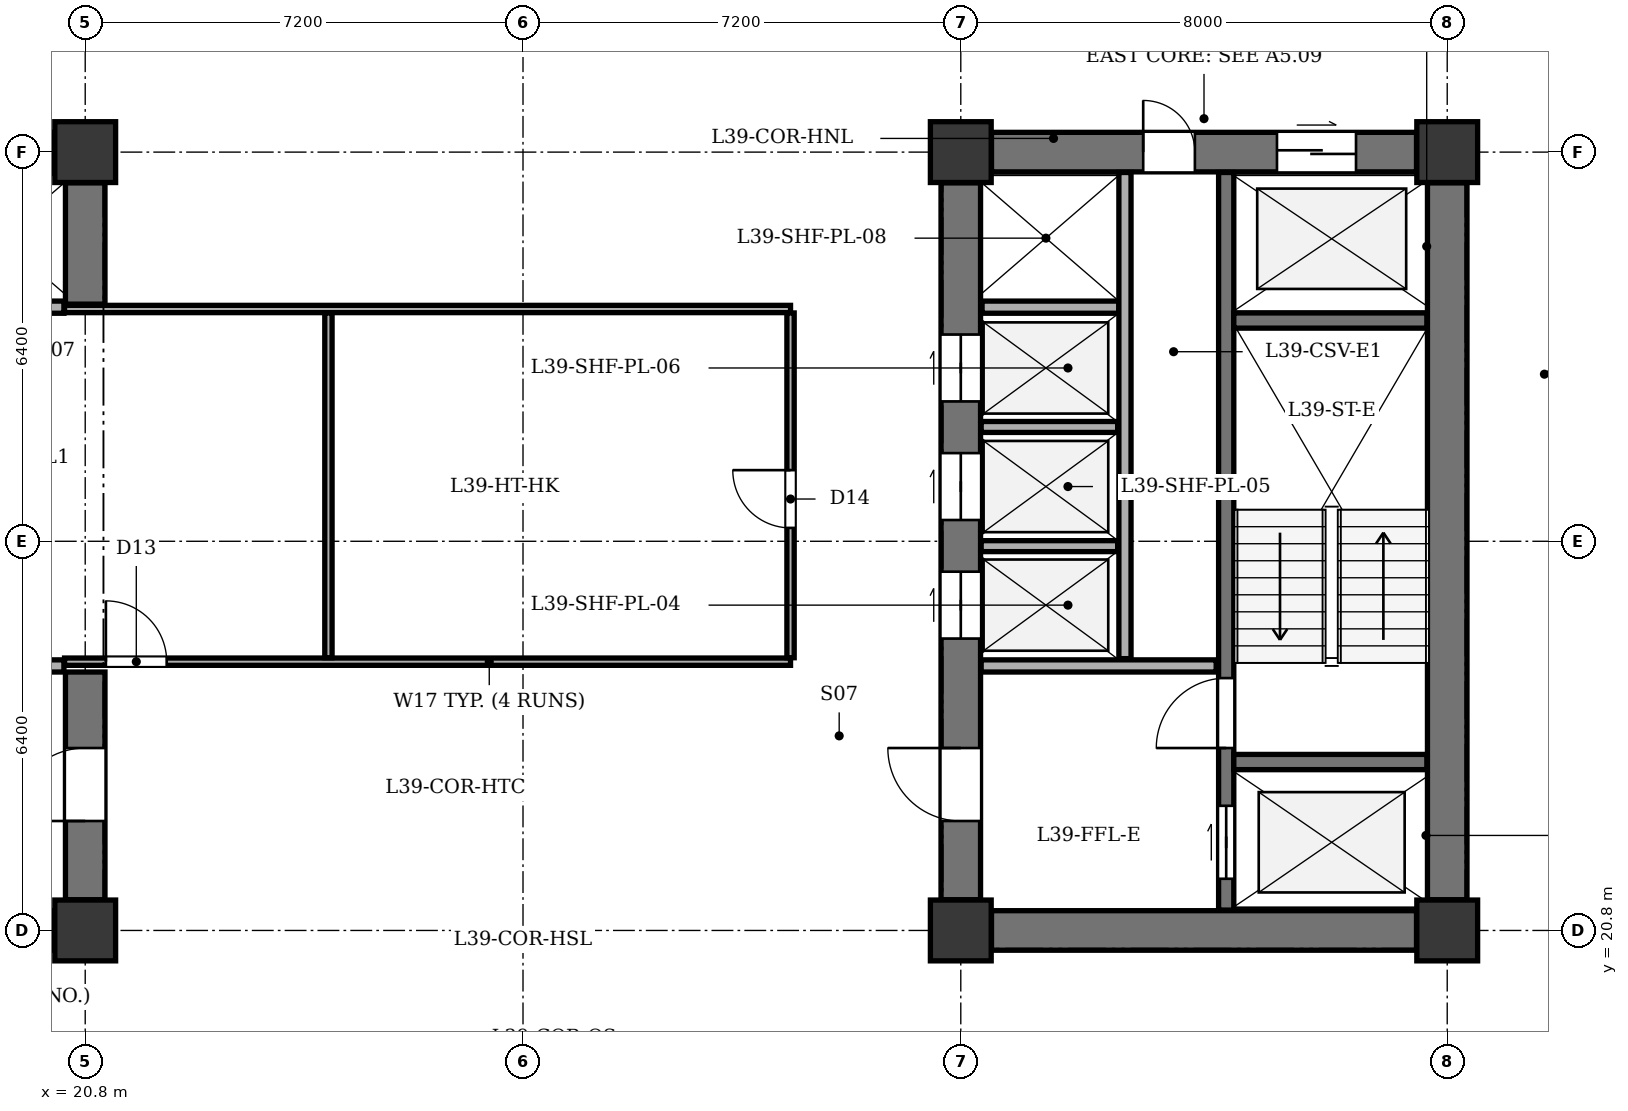
"""IFC4 building model, lengths in metres.
Left out: names, types, materials, properties, quantities, classifications, styles, units other than length and angle.
Written with IfcOpenShell. Run it as: python <this file> out.ifc"""

import sys

from ifc_helpers import new_model, si_unit, direction, frame, frame_2d, origin, origin_2d, place, context, subcontext, project, spatial, rectangle, extrude, element, fill, save


model = new_model("IFC4")
c1 = context("Model", 3, precision=1e-05, world=origin(), true_north=direction((0.0, 1.0)))
c2 = subcontext(c1, "Body", "Model", "MODEL_VIEW")
j1 = project(units=[si_unit("LENGTHUNIT", "METRE"), si_unit("PLANEANGLEUNIT", "RADIAN")], contexts=[c1])
p1 = place(None, origin())
s1 = spatial("IfcSite", under=j1, at=p1, CompositionType="ELEMENT")
p2 = place(p1, origin())
s2 = spatial("IfcBuilding", under=s1, at=p2, CompositionType="ELEMENT")
p3 = place(p2, frame((0.0, 0.0, 155.3)))
s3 = spatial("IfcBuildingStorey", under=s2, at=p3, CompositionType="ELEMENT", Elevation=155.3)
for number, where, z_axis, x_axis in (
    (1, (20.8, 20.8, 0.0), (0.0, 0.0, 1.0), (1.0, 0.0, 0.0)),
    (2, (20.8, 33.6, 0.0), (0.0, 0.0, 1.0), (1.0, 0.0, 0.0)),
    (3, (35.2, 20.8, 0.0), (0.0, 0.0, 1.0), (1.0, 0.0, 0.0)),
    (4, (43.2, 20.8, 0.0), (0.0, 0.0, 1.0), (1.0, 0.0, 0.0)),
    (5, (35.2, 33.6, 0.0), (0.0, 0.0, 1.0), (1.0, 0.0, 0.0)),
    (6, (43.2, 33.6, 0.0), (0.0, 0.0, 1.0), (1.0, 0.0, 0.0)),
):
    element("IfcColumn", number, at=place(p3, frame(where, z_axis=z_axis, x_axis=x_axis)), inside=s3, PredefinedType="COLUMN", context=c2, shape_type="SweptSolid", body=[
        extrude(rectangle(XDim=1.0, YDim=1.0, at=origin_2d()), origin(), (0.0, 0.0, 1.0), 3.5),
    ])
p4 = place(p3, frame((13.305, 20.8, 0.0), z_axis=(0.0, 0.0, 1.0), x_axis=(1.0, 0.0, 0.0)))
e7 = element("IfcWall", 7, at=p4, inside=s3, PredefinedType="SHEAR", context=c2, shape_type="SweptSolid", body=[
    extrude(rectangle(XDim=6.99, YDim=0.65, at=frame_2d((3.495, 0.0))), origin(), (0.0, 0.0, 1.0), 3.2),
])
p5 = place(p3, frame((13.305, 33.6, 0.0), z_axis=(0.0, 0.0, 1.0), x_axis=(1.0, 0.0, 0.0)))
e8 = element("IfcWall", 8, at=p5, inside=s3, PredefinedType="SHEAR", context=c2, shape_type="SweptSolid", body=[
    extrude(rectangle(XDim=6.99, YDim=0.65, at=frame_2d((3.495, 0.0))), origin(), (0.0, 0.0, 1.0), 3.2),
])
p6 = place(p5, frame((1.095, 0.0, 0.0)))
e9 = element("IfcOpeningElement", 9, at=p6, cuts=e8, PredefinedType="OPENING", context=c2, shape_type="SweptSolid", body=[
    extrude(rectangle(XDim=0.85, YDim=2.02, at=frame_2d((0.425, 1.01))), frame((0.0, 0.335, 0.0), z_axis=(0.0, -1.0, 0.0), x_axis=(1.0, 0.0, 0.0)), (0.0, 0.0, 1.0), 0.67),
])
p7 = place(p3, frame((20.8, 21.305, 0.0), z_axis=(0.0, 0.0, 1.0), x_axis=(0.0, 1.0, 0.0)))
e10 = element("IfcWall", 10, at=p7, inside=s3, PredefinedType="SHEAR", context=c2, shape_type="SweptSolid", body=[
    extrude(rectangle(XDim=3.745, YDim=0.65, at=frame_2d((1.873, 0.0))), origin(), (0.0, 0.0, 1.0), 3.2),
])
p8 = place(p7, frame((1.295, 0.0, 0.0)))
e11 = element("IfcOpeningElement", 11, at=p8, cuts=e10, PredefinedType="OPENING", context=c2, shape_type="SweptSolid", body=[
    extrude(rectangle(XDim=1.2, YDim=2.15, at=frame_2d((0.6, 1.075))), frame((0.0, 0.335, 0.0), z_axis=(0.0, -1.0, 0.0), x_axis=(1.0, 0.0, 0.0)), (0.0, 0.0, 1.0), 0.67),
])
p9 = place(p3, frame((20.8, 31.1, 0.0), z_axis=(0.0, 0.0, 1.0), x_axis=(0.0, 1.0, 0.0)))
e12 = element("IfcWall", 12, at=p9, inside=s3, PredefinedType="SHEAR", context=c2, shape_type="SweptSolid", body=[
    extrude(rectangle(XDim=1.995, YDim=0.65, at=frame_2d((0.998, 0.0))), origin(), (0.0, 0.0, 1.0), 3.2),
])
for number, where, z_axis, x_axis in (
    (13, (16.6, 25.15, 0.0), (0.0, 0.0, 1.0), (1.0, 0.0, 0.0)),
    (14, (16.6, 31.05, 0.0), (0.0, 0.0, 1.0), (1.0, 0.0, 0.0)),
):
    element("IfcWall", number, at=place(p3, frame(where, z_axis=z_axis, x_axis=x_axis)), inside=s3, PredefinedType="SOLIDWALL", context=c2, shape_type="SweptSolid", body=[
        extrude(rectangle(XDim=3.85, YDim=0.2, at=frame_2d((1.925, 0.0))), origin(), (0.0, 0.0, 1.0), 3.2),
    ])
p10 = place(p3, frame((43.2, 21.305, 0.0), z_axis=(0.0, 0.0, 1.0), x_axis=(0.0, 1.0, 0.0)))
e15 = element("IfcWall", 15, at=p10, inside=s3, PredefinedType="SHEAR", context=c2, shape_type="SweptSolid", body=[
    extrude(rectangle(XDim=11.79, YDim=0.65, at=frame_2d((5.895, 0.0))), origin(), (0.0, 0.0, 1.0), 3.2),
])
p11 = place(p3, frame((35.705, 20.8, 0.0), z_axis=(0.0, 0.0, 1.0), x_axis=(1.0, 0.0, 0.0)))
e16 = element("IfcWall", 16, at=p11, inside=s3, PredefinedType="SHEAR", context=c2, shape_type="SweptSolid", body=[
    extrude(rectangle(XDim=6.99, YDim=0.65, at=frame_2d((3.495, 0.0))), origin(), (0.0, 0.0, 1.0), 3.2),
])
p12 = place(p3, frame((35.705, 33.6, 0.0), z_axis=(0.0, 0.0, 1.0), x_axis=(1.0, 0.0, 0.0)))
e17 = element("IfcWall", 17, at=p12, inside=s3, PredefinedType="SHEAR", context=c2, shape_type="SweptSolid", body=[
    extrude(rectangle(XDim=6.99, YDim=0.65, at=frame_2d((3.495, 0.0))), origin(), (0.0, 0.0, 1.0), 3.2),
])
p13 = place(p12, frame((4.695, 0.0, 0.0)))
e18 = element("IfcOpeningElement", 18, at=p13, cuts=e17, PredefinedType="OPENING", context=c2, shape_type="SweptSolid", body=[
    extrude(rectangle(XDim=1.3, YDim=2.15, at=frame_2d((0.65, 1.075))), frame((0.0, 0.335, 0.0), z_axis=(0.0, -1.0, 0.0), x_axis=(1.0, 0.0, 0.0)), (0.0, 0.0, 1.0), 0.67),
])
p14 = place(p12, frame((2.495, 0.0, 0.0)))
e19 = element("IfcOpeningElement", 19, at=p14, cuts=e17, PredefinedType="OPENING", context=c2, shape_type="SweptSolid", body=[
    extrude(rectangle(XDim=0.85, YDim=2.02, at=frame_2d((0.425, 1.01))), frame((0.0, 0.335, 0.0), z_axis=(0.0, -1.0, 0.0), x_axis=(1.0, 0.0, 0.0)), (0.0, 0.0, 1.0), 0.67),
])
p15 = place(p3, frame((35.2, 21.305, 0.0), z_axis=(0.0, 0.0, 1.0), x_axis=(0.0, 1.0, 0.0)))
e20 = element("IfcWall", 20, at=p15, inside=s3, PredefinedType="SHEAR", context=c2, shape_type="SweptSolid", body=[
    extrude(rectangle(XDim=11.79, YDim=0.65, at=frame_2d((5.895, 0.0))), origin(), (0.0, 0.0, 1.0), 3.2),
])
p16 = place(p15, frame((1.295, 0.0, 0.0)))
e21 = element("IfcOpeningElement", 21, at=p16, cuts=e20, PredefinedType="OPENING", context=c2, shape_type="SweptSolid", body=[
    extrude(rectangle(XDim=1.2, YDim=2.15, at=frame_2d((0.6, 1.075))), frame((0.0, 0.335, 0.0), z_axis=(0.0, -1.0, 0.0), x_axis=(1.0, 0.0, 0.0)), (0.0, 0.0, 1.0), 0.67),
])
p17 = place(p15, frame((4.295, 0.0, 0.0)))
e22 = element("IfcOpeningElement", 22, at=p17, cuts=e20, PredefinedType="OPENING", context=c2, shape_type="SweptSolid", body=[
    extrude(rectangle(XDim=1.1, YDim=2.1, at=frame_2d((0.55, 1.05))), frame((0.0, 0.335, 0.0), z_axis=(0.0, -1.0, 0.0), x_axis=(1.0, 0.0, 0.0)), (0.0, 0.0, 1.0), 0.67),
])
p18 = place(p15, frame((6.245, 0.0, 0.0)))
e23 = element("IfcOpeningElement", 23, at=p18, cuts=e20, PredefinedType="OPENING", context=c2, shape_type="SweptSolid", body=[
    extrude(rectangle(XDim=1.1, YDim=2.1, at=frame_2d((0.55, 1.05))), frame((0.0, 0.335, 0.0), z_axis=(0.0, -1.0, 0.0), x_axis=(1.0, 0.0, 0.0)), (0.0, 0.0, 1.0), 0.67),
])
p19 = place(p15, frame((8.195, 0.0, 0.0)))
e24 = element("IfcOpeningElement", 24, at=p19, cuts=e20, PredefinedType="OPENING", context=c2, shape_type="SweptSolid", body=[
    extrude(rectangle(XDim=1.1, YDim=2.1, at=frame_2d((0.55, 1.05))), frame((0.0, 0.335, 0.0), z_axis=(0.0, -1.0, 0.0), x_axis=(1.0, 0.0, 0.0)), (0.0, 0.0, 1.0), 0.67),
])
p20 = place(p3, frame((39.565, 21.135, 0.0), z_axis=(0.0, 0.0, 1.0), x_axis=(0.0, 1.0, 0.0)))
e25 = element("IfcWall", 25, at=p20, inside=s3, PredefinedType="SHEAR", context=c2, shape_type="SweptSolid", body=[
    extrude(rectangle(XDim=12.13, YDim=0.25, at=frame_2d((6.065, 0.0))), origin(), (0.0, 0.0, 1.0), 3.2),
])
p21 = place(p20, frame((0.515, 0.0, 0.0)))
e26 = element("IfcOpeningElement", 26, at=p21, cuts=e25, PredefinedType="OPENING", context=c2, shape_type="SweptSolid", body=[
    extrude(rectangle(XDim=1.2, YDim=2.15, at=frame_2d((0.6, 1.075))), frame((0.0, 0.135, 0.0), z_axis=(0.0, -1.0, 0.0), x_axis=(1.0, 0.0, 0.0)), (0.0, 0.0, 1.0), 0.27),
])
p22 = place(p20, frame((2.665, 0.0, 0.0)))
e27 = element("IfcOpeningElement", 27, at=p22, cuts=e25, PredefinedType="OPENING", context=c2, shape_type="SweptSolid", body=[
    extrude(rectangle(XDim=1.15, YDim=2.15, at=frame_2d((0.575, 1.075))), frame((0.0, 0.135, 0.0), z_axis=(0.0, -1.0, 0.0), x_axis=(1.0, 0.0, 0.0)), (0.0, 0.0, 1.0), 0.27),
])
for number, where, z_axis, x_axis in (
    (28, (39.69, 23.57, 0.0), (0.0, 0.0, 1.0), (1.0, 0.0, 0.0)),
    (29, (39.69, 30.83, 0.0), (0.0, 0.0, 1.0), (1.0, 0.0, 0.0)),
):
    element("IfcWall", number, at=place(p3, frame(where, z_axis=z_axis, x_axis=x_axis)), inside=s3, PredefinedType="SHEAR", context=c2, shape_type="SweptSolid", body=[
        extrude(rectangle(XDim=3.175, YDim=0.25, at=frame_2d((1.587, 0.0))), origin(), (0.0, 0.0, 1.0), 3.2),
    ])
p23 = place(p3, frame((35.535, 25.15, 0.0), z_axis=(0.0, 0.0, 1.0), x_axis=(1.0, 0.0, 0.0)))
e30 = element("IfcWall", 30, at=p23, inside=s3, PredefinedType="SOLIDWALL", context=c2, shape_type="SweptSolid", body=[
    extrude(rectangle(XDim=3.865, YDim=0.2, at=frame_2d((1.933, 0.0))), origin(), (0.0, 0.0, 1.0), 3.2),
])
p24 = place(p3, frame((35.55, 31.05, 0.0), z_axis=(0.0, 0.0, 1.0), x_axis=(1.0, 0.0, 0.0)))
e31 = element("IfcWall", 31, at=p24, inside=s3, PredefinedType="SOLIDWALL", context=c2, shape_type="SweptSolid", body=[
    extrude(rectangle(XDim=2.25, YDim=0.2, at=frame_2d((1.125, 0.0))), origin(), (0.0, 0.0, 1.0), 3.2),
])
p25 = place(p3, frame((37.9, 25.27, 0.0), z_axis=(0.0, 0.0, 1.0), x_axis=(0.0, 1.0, 0.0)))
e32 = element("IfcWall", 32, at=p25, inside=s3, PredefinedType="SOLIDWALL", context=c2, shape_type="SweptSolid", body=[
    extrude(rectangle(XDim=7.995, YDim=0.2, at=frame_2d((3.998, 0.0))), origin(), (0.0, 0.0, 1.0), 3.2),
])
for number, where, z_axis, x_axis in (
    (33, (35.535, 27.12, 0.0), (0.0, 0.0, 1.0), (1.0, 0.0, 0.0)),
    (34, (35.535, 29.08, 0.0), (0.0, 0.0, 1.0), (1.0, 0.0, 0.0)),
):
    element("IfcWall", number, at=place(p3, frame(where, z_axis=z_axis, x_axis=x_axis)), inside=s3, PredefinedType="PARTITIONING", context=c2, shape_type="SweptSolid", body=[
        extrude(rectangle(XDim=2.245, YDim=0.18, at=frame_2d((1.123, 0.0))), origin(), (0.0, 0.0, 1.0), 3.2),
    ])
p26 = place(p3, frame((20.46, 25.22, 0.0), z_axis=(0.0, 0.0, 1.0), x_axis=(1.0, 0.0, 0.0)))
e35 = element("IfcWall", 35, at=p26, inside=s3, PredefinedType="PARTITIONING", context=c2, shape_type="SweptSolid", body=[
    extrude(rectangle(XDim=11.94, YDim=0.12, at=frame_2d((5.97, 0.0))), origin(), (0.0, 0.0, 1.0), 3.2),
])
p27 = place(p26, frame((0.68, 0.0, 0.0)))
e36 = element("IfcOpeningElement", 36, at=p27, cuts=e35, PredefinedType="OPENING", context=c2, shape_type="SweptSolid", body=[
    extrude(rectangle(XDim=1.0, YDim=2.1, at=frame_2d((0.5, 1.05))), frame((0.0, 0.07, 0.0), z_axis=(0.0, -1.0, 0.0), x_axis=(1.0, 0.0, 0.0)), (0.0, 0.0, 1.0), 0.14),
])
p28 = place(p3, frame((20.46, 31.02, 0.0), z_axis=(0.0, 0.0, 1.0), x_axis=(1.0, 0.0, 0.0)))
e37 = element("IfcWall", 37, at=p28, inside=s3, PredefinedType="PARTITIONING", context=c2, shape_type="SweptSolid", body=[
    extrude(rectangle(XDim=11.94, YDim=0.12, at=frame_2d((5.97, 0.0))), origin(), (0.0, 0.0, 1.0), 3.2),
])
p29 = place(p3, frame((32.4, 25.285, 0.0), z_axis=(0.0, 0.0, 1.0), x_axis=(0.0, 1.0, 0.0)))
e38 = element("IfcWall", 38, at=p29, inside=s3, PredefinedType="PARTITIONING", context=c2, shape_type="SweptSolid", body=[
    extrude(rectangle(XDim=5.67, YDim=0.12, at=frame_2d((2.835, 0.0))), origin(), (0.0, 0.0, 1.0), 3.2),
])
p30 = place(p29, frame((2.135, 0.0, 0.0)))
e39 = element("IfcOpeningElement", 39, at=p30, cuts=e38, PredefinedType="OPENING", context=c2, shape_type="SweptSolid", body=[
    extrude(rectangle(XDim=0.95, YDim=2.1, at=frame_2d((0.475, 1.05))), frame((0.0, 0.07, 0.0), z_axis=(0.0, -1.0, 0.0), x_axis=(1.0, 0.0, 0.0)), (0.0, 0.0, 1.0), 0.14),
])
p31 = place(p3, frame((24.8, 25.285, 0.0), z_axis=(0.0, 0.0, 1.0), x_axis=(0.0, 1.0, 0.0)))
e40 = element("IfcWall", 40, at=p31, inside=s3, PredefinedType="PARTITIONING", context=c2, shape_type="SweptSolid", body=[
    extrude(rectangle(XDim=5.67, YDim=0.12, at=frame_2d((2.835, 0.0))), origin(), (0.0, 0.0, 1.0), 3.2),
])
p32 = place(p8, origin())
e41 = element("IfcDoor", 41, at=p32, inside=s3, OperationType="SINGLE_SWING_LEFT", PredefinedType="DOOR", context=c2, shape_type="SweptSolid", body=[
    extrude(rectangle(XDim=1.2, YDim=2.15, at=frame_2d((0.6, 1.075))), frame((0.0, 0.025, 0.0), z_axis=(0.0, -1.0, 0.0), x_axis=(1.0, 0.0, 0.0)), (0.0, 0.0, 1.0), 0.05),
])
fill(e11, e41)
p33 = place(p13, origin())
e42 = element("IfcDoor", 42, at=p33, inside=s3, OperationType="DOUBLE_DOOR_SLIDING", PredefinedType="DOOR", context=c2, shape_type="SweptSolid", body=[
    extrude(rectangle(XDim=1.3, YDim=2.15, at=frame_2d((0.65, 1.075))), frame((0.0, 0.025, 0.0), z_axis=(0.0, -1.0, 0.0), x_axis=(1.0, 0.0, 0.0)), (0.0, 0.0, 1.0), 0.05),
])
fill(e18, e42)
p34 = place(p14, origin())
e43 = element("IfcDoor", 43, at=p34, inside=s3, OperationType="SINGLE_SWING_LEFT", PredefinedType="DOOR", context=c2, shape_type="SweptSolid", body=[
    extrude(rectangle(XDim=0.85, YDim=2.02, at=frame_2d((0.425, 1.01))), frame((0.0, 0.025, 0.0), z_axis=(0.0, -1.0, 0.0), x_axis=(1.0, 0.0, 0.0)), (0.0, 0.0, 1.0), 0.05),
])
fill(e19, e43)
p35 = place(p16, origin())
e44 = element("IfcDoor", 44, at=p35, inside=s3, OperationType="SINGLE_SWING_RIGHT", PredefinedType="DOOR", context=c2, shape_type="SweptSolid", body=[
    extrude(rectangle(XDim=1.2, YDim=2.15, at=frame_2d((0.6, 1.075))), frame((0.0, 0.025, 0.0), z_axis=(0.0, -1.0, 0.0), x_axis=(1.0, 0.0, 0.0)), (0.0, 0.0, 1.0), 0.05),
])
fill(e21, e44)
p36 = place(p17, origin())
e45 = element("IfcDoor", 45, at=p36, inside=s3, OperationType="DOUBLE_DOOR_SLIDING", PredefinedType="DOOR", context=c2, shape_type="SweptSolid", body=[
    extrude(rectangle(XDim=1.1, YDim=2.1, at=frame_2d((0.55, 1.05))), frame((0.0, 0.025, 0.0), z_axis=(0.0, -1.0, 0.0), x_axis=(1.0, 0.0, 0.0)), (0.0, 0.0, 1.0), 0.05),
])
fill(e22, e45)
p37 = place(p18, origin())
e46 = element("IfcDoor", 46, at=p37, inside=s3, OperationType="DOUBLE_DOOR_SLIDING", PredefinedType="DOOR", context=c2, shape_type="SweptSolid", body=[
    extrude(rectangle(XDim=1.1, YDim=2.1, at=frame_2d((0.55, 1.05))), frame((0.0, 0.025, 0.0), z_axis=(0.0, -1.0, 0.0), x_axis=(1.0, 0.0, 0.0)), (0.0, 0.0, 1.0), 0.05),
])
fill(e23, e46)
p38 = place(p19, origin())
e47 = element("IfcDoor", 47, at=p38, inside=s3, OperationType="DOUBLE_DOOR_SLIDING", PredefinedType="DOOR", context=c2, shape_type="SweptSolid", body=[
    extrude(rectangle(XDim=1.1, YDim=2.1, at=frame_2d((0.55, 1.05))), frame((0.0, 0.025, 0.0), z_axis=(0.0, -1.0, 0.0), x_axis=(1.0, 0.0, 0.0)), (0.0, 0.0, 1.0), 0.05),
])
fill(e24, e47)
p39 = place(p21, origin())
e48 = element("IfcDoor", 48, at=p39, inside=s3, OperationType="DOUBLE_DOOR_SLIDING", PredefinedType="DOOR", context=c2, shape_type="SweptSolid", body=[
    extrude(rectangle(XDim=1.2, YDim=2.15, at=frame_2d((0.6, 1.075))), frame((0.0, 0.025, 0.0), z_axis=(0.0, -1.0, 0.0), x_axis=(1.0, 0.0, 0.0)), (0.0, 0.0, 1.0), 0.05),
])
fill(e26, e48)
p40 = place(p22, origin())
e49 = element("IfcDoor", 49, at=p40, inside=s3, OperationType="SINGLE_SWING_LEFT", PredefinedType="DOOR", context=c2, shape_type="SweptSolid", body=[
    extrude(rectangle(XDim=1.15, YDim=2.15, at=frame_2d((0.575, 1.075))), frame((0.0, 0.025, 0.0), z_axis=(0.0, -1.0, 0.0), x_axis=(1.0, 0.0, 0.0)), (0.0, 0.0, 1.0), 0.05),
])
fill(e27, e49)
p41 = place(p27, origin())
e50 = element("IfcDoor", 50, at=p41, inside=s3, OperationType="SINGLE_SWING_LEFT", PredefinedType="DOOR", context=c2, shape_type="SweptSolid", body=[
    extrude(rectangle(XDim=1.0, YDim=2.1, at=frame_2d((0.5, 1.05))), frame((0.0, 0.025, 0.0), z_axis=(0.0, -1.0, 0.0), x_axis=(1.0, 0.0, 0.0)), (0.0, 0.0, 1.0), 0.05),
])
fill(e36, e50)
p42 = place(p30, origin())
e51 = element("IfcDoor", 51, at=p42, inside=s3, OperationType="SINGLE_SWING_RIGHT", PredefinedType="DOOR", context=c2, shape_type="SweptSolid", body=[
    extrude(rectangle(XDim=0.95, YDim=2.1, at=frame_2d((0.475, 1.05))), frame((0.0, 0.025, 0.0), z_axis=(0.0, -1.0, 0.0), x_axis=(1.0, 0.0, 0.0)), (0.0, 0.0, 1.0), 0.05),
])
fill(e39, e51)
save(model, sys.argv[1])
